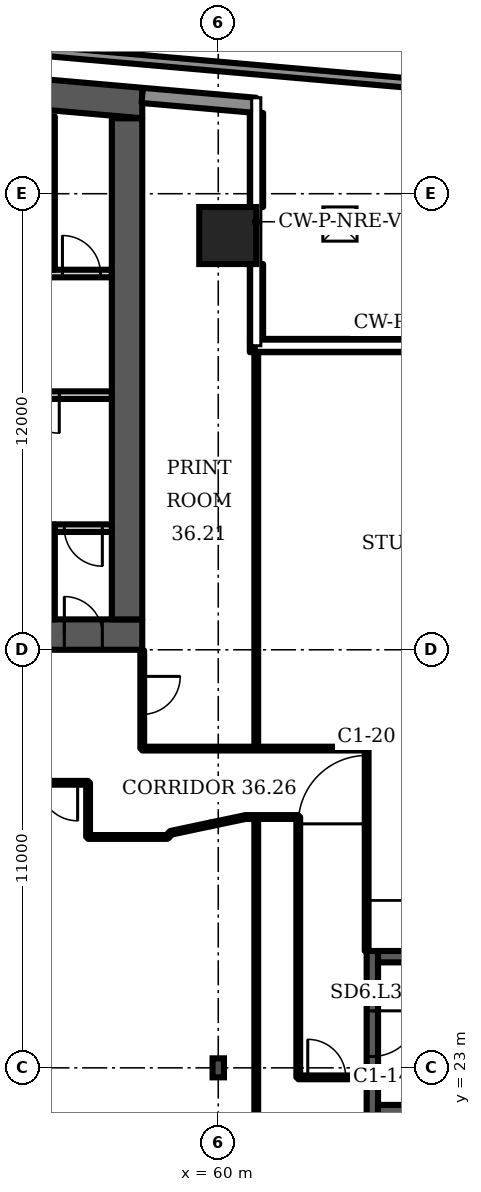
"""IFC4 building model, lengths in metres.
Left out: names, types, materials, properties, quantities, classifications, styles, units other than length and angle.
Written with IfcOpenShell. Run it as: python <this file> out.ifc"""

import sys

from ifc_helpers import new_model, si_unit, direction, frame, frame_2d, origin, origin_2d, place, context, subcontext, project, spatial, polyline, rectangle, i_section, outline, extrude, element, fill, save


model = new_model("IFC4")
c1 = context("Model", 3, precision=1e-05, world=origin(), true_north=direction((0.0, 1.0)))
c2 = subcontext(c1, "Body", "Model", "MODEL_VIEW")
j1 = project(units=[si_unit("LENGTHUNIT", "METRE"), si_unit("PLANEANGLEUNIT", "RADIAN")], contexts=[c1])
p1 = place(None, origin())
s1 = spatial("IfcSite", under=j1, at=p1, CompositionType="ELEMENT")
p2 = place(p1, origin())
s2 = spatial("IfcBuilding", under=s1, at=p2, CompositionType="ELEMENT")
p3 = place(p2, frame((0.0, 0.0, 151.9)))
s3 = spatial("IfcBuildingStorey", under=s2, at=p3, CompositionType="ELEMENT", Elevation=151.9)
p4 = place(p3, origin())
e1 = element("IfcWall", 1, at=p4, inside=s3, PredefinedType="SHEAR", context=c2, shape_type="SweptSolid", body=[
    extrude(outline(polyline([(16.0, 47.984), (37.0, 49.822), (58.0, 47.984), (58.0, 48.787), (37.0, 50.625), (16.0, 48.787), (16.0, 47.984)])), origin(), (0.0, 0.0, 1.0), 3.6),
])
p5 = place(p3, frame((16.0, 34.4, 0.0), z_axis=(0.0, 0.0, 1.0), x_axis=(1.0, 0.0, 0.0)))
e2 = element("IfcWall", 2, at=p5, inside=s3, PredefinedType="SHEAR", context=c2, shape_type="SweptSolid", body=[
    extrude(rectangle(XDim=42.0, YDim=0.8, at=frame_2d((21.0, 0.0))), origin(), (0.0, 0.0, 1.0), 3.6),
])
p6 = place(p5, frame((3.2, 0.0, 0.0)))
e3 = element("IfcOpeningElement", 3, at=p6, cuts=e2, PredefinedType="OPENING", context=c2, shape_type="SweptSolid", body=[
    extrude(rectangle(XDim=1.0, YDim=2.1, at=frame_2d((0.5, 1.05))), frame((0.0, 0.41, 0.0), z_axis=(0.0, -1.0, 0.0), x_axis=(1.0, 0.0, 0.0)), (0.0, 0.0, 1.0), 0.82),
])
p7 = place(p5, frame((7.65, 0.0, 0.0)))
e4 = element("IfcOpeningElement", 4, at=p7, cuts=e2, PredefinedType="OPENING", context=c2, shape_type="SweptSolid", body=[
    extrude(rectangle(XDim=1.2, YDim=2.1, at=frame_2d((0.6, 1.05))), frame((0.0, 0.41, 0.0), z_axis=(0.0, -1.0, 0.0), x_axis=(1.0, 0.0, 0.0)), (0.0, 0.0, 1.0), 0.82),
])
p8 = place(p5, frame((14.767, 0.0, 0.0)))
e5 = element("IfcOpeningElement", 5, at=p8, cuts=e2, PredefinedType="OPENING", context=c2, shape_type="SweptSolid", body=[
    extrude(rectangle(XDim=1.1, YDim=2.1, at=frame_2d((0.55, 1.05))), frame((0.0, 0.41, 0.0), z_axis=(0.0, -1.0, 0.0), x_axis=(1.0, 0.0, 0.0)), (0.0, 0.0, 1.0), 0.82),
])
p9 = place(p5, frame((19.133, 0.0, 0.0)))
e6 = element("IfcOpeningElement", 6, at=p9, cuts=e2, PredefinedType="OPENING", context=c2, shape_type="SweptSolid", body=[
    extrude(rectangle(XDim=1.1, YDim=2.1, at=frame_2d((0.55, 1.05))), frame((0.0, 0.41, 0.0), z_axis=(0.0, -1.0, 0.0), x_axis=(1.0, 0.0, 0.0)), (0.0, 0.0, 1.0), 0.82),
])
p10 = place(p5, frame((16.8, 0.0, 0.0)))
e7 = element("IfcOpeningElement", 7, at=p10, cuts=e2, PredefinedType="OPENING", context=c2, shape_type="SweptSolid", body=[
    extrude(rectangle(XDim=1.4, YDim=2.1, at=frame_2d((0.7, 1.05))), frame((0.0, 0.41, 0.0), z_axis=(0.0, -1.0, 0.0), x_axis=(1.0, 0.0, 0.0)), (0.0, 0.0, 1.0), 0.82),
])
p11 = place(p5, frame((21.767, 0.0, 0.0)))
e8 = element("IfcOpeningElement", 8, at=p11, cuts=e2, PredefinedType="OPENING", context=c2, shape_type="SweptSolid", body=[
    extrude(rectangle(XDim=1.1, YDim=2.1, at=frame_2d((0.55, 1.05))), frame((0.0, 0.41, 0.0), z_axis=(0.0, -1.0, 0.0), x_axis=(1.0, 0.0, 0.0)), (0.0, 0.0, 1.0), 0.82),
])
p12 = place(p5, frame((23.95, 0.0, 0.0)))
e9 = element("IfcOpeningElement", 9, at=p12, cuts=e2, PredefinedType="OPENING", context=c2, shape_type="SweptSolid", body=[
    extrude(rectangle(XDim=1.1, YDim=2.1, at=frame_2d((0.55, 1.05))), frame((0.0, 0.41, 0.0), z_axis=(0.0, -1.0, 0.0), x_axis=(1.0, 0.0, 0.0)), (0.0, 0.0, 1.0), 0.82),
])
p13 = place(p5, frame((26.133, 0.0, 0.0)))
e10 = element("IfcOpeningElement", 10, at=p13, cuts=e2, PredefinedType="OPENING", context=c2, shape_type="SweptSolid", body=[
    extrude(rectangle(XDim=1.1, YDim=2.1, at=frame_2d((0.55, 1.05))), frame((0.0, 0.41, 0.0), z_axis=(0.0, -1.0, 0.0), x_axis=(1.0, 0.0, 0.0)), (0.0, 0.0, 1.0), 0.82),
])
p14 = place(p5, frame((33.15, 0.0, 0.0)))
e11 = element("IfcOpeningElement", 11, at=p14, cuts=e2, PredefinedType="OPENING", context=c2, shape_type="SweptSolid", body=[
    extrude(rectangle(XDim=1.2, YDim=2.1, at=frame_2d((0.6, 1.05))), frame((0.0, 0.41, 0.0), z_axis=(0.0, -1.0, 0.0), x_axis=(1.0, 0.0, 0.0)), (0.0, 0.0, 1.0), 0.82),
])
p15 = place(p5, frame((35.817, 0.0, 0.0)))
e12 = element("IfcOpeningElement", 12, at=p15, cuts=e2, PredefinedType="OPENING", context=c2, shape_type="SweptSolid", body=[
    extrude(rectangle(XDim=1.0, YDim=2.1, at=frame_2d((0.5, 1.05))), frame((0.0, 0.41, 0.0), z_axis=(0.0, -1.0, 0.0), x_axis=(1.0, 0.0, 0.0)), (0.0, 0.0, 1.0), 0.82),
])
p16 = place(p5, frame((39.95, 0.0, 0.0)))
e13 = element("IfcOpeningElement", 13, at=p16, cuts=e2, PredefinedType="OPENING", context=c2, shape_type="SweptSolid", body=[
    extrude(rectangle(XDim=1.0, YDim=2.1, at=frame_2d((0.5, 1.05))), frame((0.0, 0.41, 0.0), z_axis=(0.0, -1.0, 0.0), x_axis=(1.0, 0.0, 0.0)), (0.0, 0.0, 1.0), 0.82),
])
p17 = place(p5, frame((37.767, 0.0, 0.0)))
e14 = element("IfcOpeningElement", 14, at=p17, cuts=e2, PredefinedType="OPENING", context=c2, shape_type="SweptSolid", body=[
    extrude(rectangle(XDim=1.4, YDim=2.1, at=frame_2d((0.7, 1.05))), frame((0.0, 0.41, 0.0), z_axis=(0.0, -1.0, 0.0), x_axis=(1.0, 0.0, 0.0)), (0.0, 0.0, 1.0), 0.82),
])
p18 = place(p3, frame((57.6, 34.8, 0.0), z_axis=(0.0, 0.0, 1.0), x_axis=(0.0, 1.0, 0.0)))
e15 = element("IfcWall", 15, at=p18, inside=s3, PredefinedType="SHEAR", context=c2, shape_type="SweptSolid", body=[
    extrude(rectangle(XDim=13.184, YDim=0.8, at=frame_2d((6.592, 0.0))), origin(), (0.0, 0.0, 1.0), 3.6),
])
p19 = place(p3, frame((60.25, 44.9, 0.0), z_axis=(0.0, 0.0, 1.0), x_axis=(1.0, 0.0, 0.0)))
e16 = element("IfcColumn", 16, at=p19, inside=s3, PredefinedType="COLUMN", context=c2, shape_type="SweptSolid", body=[
    extrude(rectangle(XDim=1.5, YDim=1.5, at=origin_2d()), origin(), (0.0, 0.0, 1.0), 3.6),
])
p20 = place(p3, frame((60.0, 23.0, 0.0), z_axis=(0.0, 0.0, 1.0), x_axis=(1.0, 0.0, 0.0)))
e17 = element("IfcColumn", 17, at=p20, inside=s3, PredefinedType="COLUMN", context=c2, shape_type="SweptSolid", body=[
    extrude(i_section(OverallWidth=0.3, OverallDepth=0.5, WebThickness=0.014, FlangeThickness=0.028, FilletRadius=0.027, at=origin_2d()), origin(), (0.0, 0.0, 1.0), 3.6),
])
p21 = place(p3, frame((60.983, 48.326, 0.0), z_axis=(0.0, 0.0, 1.0), x_axis=(-0.996194, 0.087168, 0.0)))
e18 = element("IfcWall", 18, at=p21, inside=s3, PredefinedType="SOLIDWALL", context=c2, shape_type="SweptSolid", body=[
    extrude(rectangle(XDim=2.994, YDim=0.4, at=frame_2d((1.497, 0.0))), origin(), (0.0, 0.0, 1.0), 3.2),
])
p22 = place(p3, frame((40.5, 51.056, 0.0), z_axis=(0.0, 0.0, 1.0), x_axis=(0.996199, -0.087155, 0.0)))
e19 = element("IfcWall", 19, at=p22, inside=s3, PredefinedType="PARAPET", context=c2, shape_type="SweptSolid", body=[
    extrude(rectangle(XDim=27.855, YDim=0.25, at=frame_2d((13.928, 0.0))), origin(), (0.0, 0.0, 1.0), 1.1),
])
p23 = place(p3, frame((68.0, 42.005, 0.0), z_axis=(0.0, 0.0, 1.0), x_axis=(-1.0, 0.0, 0.0)))
e20 = element("IfcWall", 20, at=p23, inside=s3, PredefinedType="SOLIDWALL", context=c2, shape_type="SweptSolid", body=[
    extrude(rectangle(XDim=7.17, YDim=0.35, at=frame_2d((3.585, 0.0))), origin(), (0.0, 0.0, 1.0), 1.0),
])
p24 = place(p3, frame((61.005, 42.18, 0.0), z_axis=(0.0, 0.0, 1.0), x_axis=(0.0, 1.0, 0.0)))
e21 = element("IfcWall", 21, at=p24, inside=s3, PredefinedType="SOLIDWALL", context=c2, shape_type="SweptSolid", body=[
    extrude(rectangle(XDim=1.97, YDim=0.35, at=frame_2d((0.985, 0.0))), origin(), (0.0, 0.0, 1.0), 1.0),
])
p25 = place(p3, frame((61.005, 45.65, 0.0), z_axis=(0.0, 0.0, 1.0), x_axis=(0.0, 1.0, 0.0)))
e22 = element("IfcWall", 22, at=p25, inside=s3, PredefinedType="SOLIDWALL", context=c2, shape_type="SweptSolid", body=[
    extrude(rectangle(XDim=2.477, YDim=0.35, at=frame_2d((1.238, 0.0))), origin(), (0.0, 0.0, 1.0), 1.0),
])
p26 = place(p3, frame((55.7, 37.2, 0.0), z_axis=(0.0, 0.0, 1.0), x_axis=(1.0, 0.0, 0.0)))
e23 = element("IfcWall", 23, at=p26, inside=s3, PredefinedType="PARTITIONING", context=c2, shape_type="SweptSolid", body=[
    extrude(rectangle(XDim=1.5, YDim=0.2, at=frame_2d((0.75, 0.0))), origin(), (0.0, 0.0, 1.0), 3.2),
])
p27 = place(p26, frame((0.25, 0.0, 0.0)))
e24 = element("IfcOpeningElement", 24, at=p27, cuts=e23, PredefinedType="OPENING", context=c2, shape_type="SweptSolid", body=[
    extrude(rectangle(XDim=1.0, YDim=2.1, at=frame_2d((0.5, 1.05))), frame((0.0, 0.11, 0.0), z_axis=(0.0, -1.0, 0.0), x_axis=(1.0, 0.0, 0.0)), (0.0, 0.0, 1.0), 0.22),
])
p28 = place(p3, frame((51.4, 40.7, 0.0), z_axis=(0.0, 0.0, 1.0), x_axis=(1.0, 0.0, 0.0)))
e25 = element("IfcWall", 25, at=p28, inside=s3, PredefinedType="PARTITIONING", context=c2, shape_type="SweptSolid", body=[
    extrude(rectangle(XDim=5.8, YDim=0.2, at=frame_2d((2.9, 0.0))), origin(), (0.0, 0.0, 1.0), 3.2),
])
p29 = place(p28, frame((0.367, 0.0, 0.0)))
e26 = element("IfcOpeningElement", 26, at=p29, cuts=e25, PredefinedType="OPENING", context=c2, shape_type="SweptSolid", body=[
    extrude(rectangle(XDim=1.1, YDim=2.1, at=frame_2d((0.55, 1.05))), frame((0.0, 0.11, 0.0), z_axis=(0.0, -1.0, 0.0), x_axis=(1.0, 0.0, 0.0)), (0.0, 0.0, 1.0), 0.22),
])
p30 = place(p28, frame((3.417, 0.0, 0.0)))
e27 = element("IfcOpeningElement", 27, at=p30, cuts=e25, PredefinedType="OPENING", context=c2, shape_type="SweptSolid", body=[
    extrude(rectangle(XDim=1.0, YDim=2.1, at=frame_2d((0.5, 1.05))), frame((0.0, 0.11, 0.0), z_axis=(0.0, -1.0, 0.0), x_axis=(1.0, 0.0, 0.0)), (0.0, 0.0, 1.0), 0.22),
])
p31 = place(p3, frame((51.4, 43.9, 0.0), z_axis=(0.0, 0.0, 1.0), x_axis=(1.0, 0.0, 0.0)))
e28 = element("IfcWall", 28, at=p31, inside=s3, PredefinedType="PARTITIONING", context=c2, shape_type="SweptSolid", body=[
    extrude(rectangle(XDim=5.8, YDim=0.2, at=frame_2d((2.9, 0.0))), origin(), (0.0, 0.0, 1.0), 3.2),
])
p32 = place(p31, frame((2.617, 0.0, 0.0)))
e29 = element("IfcOpeningElement", 29, at=p32, cuts=e28, PredefinedType="OPENING", context=c2, shape_type="SweptSolid", body=[
    extrude(rectangle(XDim=1.0, YDim=2.1, at=frame_2d((0.5, 1.05))), frame((0.0, 0.11, 0.0), z_axis=(0.0, -1.0, 0.0), x_axis=(1.0, 0.0, 0.0)), (0.0, 0.0, 1.0), 0.22),
])
p33 = place(p31, frame((4.5, 0.0, 0.0)))
e30 = element("IfcOpeningElement", 30, at=p33, cuts=e28, PredefinedType="OPENING", context=c2, shape_type="SweptSolid", body=[
    extrude(rectangle(XDim=1.0, YDim=2.1, at=frame_2d((0.5, 1.05))), frame((0.0, 0.11, 0.0), z_axis=(0.0, -1.0, 0.0), x_axis=(1.0, 0.0, 0.0)), (0.0, 0.0, 1.0), 0.22),
])
p34 = place(p3, origin())
e31 = element("IfcWall", 31, at=p34, inside=s3, PredefinedType="PARTITIONING", context=c2, shape_type="SweptSolid", body=[
    extrude(outline(polyline([(55.5, 34.8), (55.5, 37.3), (55.7, 37.3), (55.7, 34.8), (55.5, 34.8)])), origin(), (0.0, 0.0, 1.0), 3.2),
])
p35 = place(p3, frame((55.6, 44.0, 0.0), z_axis=(0.0, 0.0, 1.0), x_axis=(0.0, 1.0, 0.0)))
e32 = element("IfcWall", 32, at=p35, inside=s3, PredefinedType="PARTITIONING", context=c2, shape_type="SweptSolid", body=[
    extrude(rectangle(XDim=4.034, YDim=0.2, at=frame_2d((2.017, 0.0))), origin(), (0.0, 0.0, 1.0), 3.2),
])
p36 = place(p3, frame((64.055, 21.725, 0.0), z_axis=(0.0, 0.0, 1.0), x_axis=(0.0, 1.0, 0.0)))
e33 = element("IfcWall", 33, at=p36, inside=s3, PredefinedType="SHEAR", context=c2, shape_type="SweptSolid", body=[
    extrude(rectangle(XDim=4.35, YDim=0.3, at=frame_2d((2.175, 0.0))), origin(), (0.0, 0.0, 1.0), 3.2),
])
p37 = place(p36, frame((1.575, 0.0, 0.0)))
e34 = element("IfcOpeningElement", 34, at=p37, cuts=e33, PredefinedType="OPENING", context=c2, shape_type="SweptSolid", body=[
    extrude(rectangle(XDim=1.2, YDim=2.1, at=frame_2d((0.6, 1.05))), frame((0.0, 0.16, 0.0), z_axis=(0.0, -1.0, 0.0), x_axis=(1.0, 0.0, 0.0)), (0.0, 0.0, 1.0), 0.32),
])
p38 = place(p3, frame((56.575, 29.075, 0.0), z_axis=(0.0, 0.0, 1.0), x_axis=(0.0, 1.0, 0.0)))
e35 = element("IfcWall", 35, at=p38, inside=s3, PredefinedType="PARTITIONING", context=c2, shape_type="SweptSolid", body=[
    extrude(rectangle(XDim=1.425, YDim=0.1, at=frame_2d((0.712, 0.0))), origin(), (0.0, 0.0, 1.0), 3.2),
])
p39 = place(p3, frame((56.575, 29.075, 0.0), z_axis=(0.0, 0.0, 1.0), x_axis=(1.0, 0.0, 0.0)))
e36 = element("IfcWall", 36, at=p39, inside=s3, PredefinedType="PARTITIONING", context=c2, shape_type="SweptSolid", body=[
    extrude(rectangle(XDim=2.08, YDim=0.1, at=frame_2d((1.04, 0.0))), origin(), (0.0, 0.0, 1.0), 3.2),
])
p40 = place(p3, frame((58.0, 31.4, 0.0), z_axis=(0.0, 0.0, 1.0), x_axis=(0.0, 1.0, 0.0)))
e37 = element("IfcWall", 37, at=p40, inside=s3, PredefinedType="PARTITIONING", context=c2, shape_type="SweptSolid", body=[
    extrude(rectangle(XDim=2.58, YDim=0.1, at=frame_2d((1.29, 0.0))), origin(), (0.0, 0.0, 1.0), 3.2),
])
p41 = place(p40, frame((0.9, 0.0, 0.0)))
e38 = element("IfcOpeningElement", 38, at=p41, cuts=e37, PredefinedType="OPENING", context=c2, shape_type="SweptSolid", body=[
    extrude(rectangle(XDim=1.0, YDim=2.1, at=frame_2d((0.5, 1.05))), frame((0.0, 0.06, 0.0), z_axis=(0.0, -1.0, 0.0), x_axis=(1.0, 0.0, 0.0)), (0.0, 0.0, 1.0), 0.12),
])
p42 = place(p3, frame((58.0, 31.4, 0.0), z_axis=(0.0, 0.0, 1.0), x_axis=(1.0, 0.0, 0.0)))
e39 = element("IfcWall", 39, at=p42, inside=s3, PredefinedType="PARTITIONING", context=c2, shape_type="SweptSolid", body=[
    extrude(rectangle(XDim=5.905, YDim=0.1, at=frame_2d((2.953, 0.0))), origin(), (0.0, 0.0, 1.0), 3.2),
])
p43 = place(p3, frame((58.655, 29.075, 0.0), z_axis=(0.0, 0.0, 1.0), x_axis=(0.671773, 0.740757, 0.0)))
e40 = element("IfcWall", 40, at=p43, inside=s3, PredefinedType="PARTITIONING", context=c2, shape_type="SweptSolid", body=[
    extrude(rectangle(XDim=0.149, YDim=0.1, at=frame_2d((0.074, 0.0))), origin(), (0.0, 0.0, 1.0), 3.2),
])
p44 = place(p3, frame((58.755, 29.185, 0.0), z_axis=(0.0, 0.0, 1.0), x_axis=(0.97816, 0.207859, 0.0)))
e41 = element("IfcWall", 41, at=p44, inside=s3, PredefinedType="PARTITIONING", context=c2, shape_type="SweptSolid", body=[
    extrude(rectangle(XDim=1.058, YDim=0.1, at=frame_2d((0.529, 0.0))), origin(), (0.0, 0.0, 1.0), 3.2),
])
p45 = place(p3, frame((59.79, 29.405, 0.0), z_axis=(0.0, 0.0, 1.0), x_axis=(0.978703, 0.205299, 0.0)))
e42 = element("IfcWall", 42, at=p45, inside=s3, PredefinedType="PARTITIONING", context=c2, shape_type="SweptSolid", body=[
    extrude(rectangle(XDim=0.95, YDim=0.1, at=frame_2d((0.475, 0.0))), origin(), (0.0, 0.0, 1.0), 3.2),
])
p46 = place(p3, frame((60.72, 29.6, 0.0), z_axis=(0.0, 0.0, 1.0), x_axis=(1.0, 0.0, 0.0)))
e43 = element("IfcWall", 43, at=p46, inside=s3, PredefinedType="PARTITIONING", context=c2, shape_type="SweptSolid", body=[
    extrude(rectangle(XDim=1.385, YDim=0.1, at=frame_2d((0.692, 0.0))), origin(), (0.0, 0.0, 1.0), 3.2),
])
p47 = place(p3, frame((61.0, 15.27, 0.0), z_axis=(0.0, 0.0, 1.0), x_axis=(0.0, 1.0, 0.0)))
e44 = element("IfcWall", 44, at=p47, inside=s3, PredefinedType="PARTITIONING", context=c2, shape_type="SweptSolid", body=[
    extrude(rectangle(XDim=14.33, YDim=0.1, at=frame_2d((7.165, 0.0))), origin(), (0.0, 0.0, 1.0), 3.2),
])
p48 = place(p3, frame((61.0, 31.4, 0.0), z_axis=(0.0, 0.0, 1.0), x_axis=(0.0, 1.0, 0.0)))
e45 = element("IfcWall", 45, at=p48, inside=s3, PredefinedType="PARTITIONING", context=c2, shape_type="SweptSolid", body=[
    extrude(rectangle(XDim=10.58, YDim=0.1, at=frame_2d((5.29, 0.0))), origin(), (0.0, 0.0, 1.0), 3.2),
])
p49 = place(p3, frame((62.105, 22.75, 0.0), z_axis=(0.0, 0.0, 1.0), x_axis=(0.0, 1.0, 0.0)))
e46 = element("IfcWall", 46, at=p49, inside=s3, PredefinedType="PARTITIONING", context=c2, shape_type="SweptSolid", body=[
    extrude(rectangle(XDim=6.85, YDim=0.1, at=frame_2d((3.425, 0.0))), origin(), (0.0, 0.0, 1.0), 3.2),
])
p50 = place(p3, frame((62.105, 22.75, 0.0), z_axis=(0.0, 0.0, 1.0), x_axis=(1.0, 0.0, 0.0)))
e47 = element("IfcWall", 47, at=p50, inside=s3, PredefinedType="PARTITIONING", context=c2, shape_type="SweptSolid", body=[
    extrude(rectangle(XDim=1.78, YDim=0.1, at=frame_2d((0.89, 0.0))), origin(), (0.0, 0.0, 1.0), 3.2),
])
p51 = place(p50, frame((0.25, 0.0, 0.0)))
e48 = element("IfcOpeningElement", 48, at=p51, cuts=e47, PredefinedType="OPENING", context=c2, shape_type="SweptSolid", body=[
    extrude(rectangle(XDim=1.0, YDim=2.1, at=frame_2d((0.5, 1.05))), frame((0.0, 0.06, 0.0), z_axis=(0.0, -1.0, 0.0), x_axis=(1.0, 0.0, 0.0)), (0.0, 0.0, 1.0), 0.12),
])
p52 = place(p3, frame((63.905, 26.075, 0.0), z_axis=(0.0, 0.0, 1.0), x_axis=(0.0, 1.0, 0.0)))
e49 = element("IfcWall", 49, at=p52, inside=s3, PredefinedType="PARTITIONING", context=c2, shape_type="SweptSolid", body=[
    extrude(rectangle(XDim=5.325, YDim=0.1, at=frame_2d((2.663, 0.0))), origin(), (0.0, 0.0, 1.0), 3.2),
])
p53 = place(p52, frame((3.345, 0.0, 0.0)))
e50 = element("IfcOpeningElement", 50, at=p53, cuts=e49, PredefinedType="OPENING", context=c2, shape_type="SweptSolid", body=[
    extrude(rectangle(XDim=1.8, YDim=2.1, at=frame_2d((0.9, 1.05))), frame((0.0, 0.06, 0.0), z_axis=(0.0, -1.0, 0.0), x_axis=(1.0, 0.0, 0.0)), (0.0, 0.0, 1.0), 0.12),
])
p54 = place(p3, frame((44.15, 30.5, 0.0), z_axis=(0.0, 0.0, 1.0), x_axis=(1.0, 0.0, 0.0)))
e51 = element("IfcWall", 51, at=p54, inside=s3, PredefinedType="PARTITIONING", context=c2, shape_type="SweptSolid", body=[
    extrude(rectangle(XDim=12.425, YDim=0.1, at=frame_2d((6.212, 0.0))), origin(), (0.0, 0.0, 1.0), 3.2),
])
p55 = place(p54, frame((11.15, 0.0, 0.0)))
e52 = element("IfcOpeningElement", 52, at=p55, cuts=e51, PredefinedType="OPENING", context=c2, shape_type="SweptSolid", body=[
    extrude(rectangle(XDim=1.0, YDim=2.1, at=frame_2d((0.5, 1.05))), frame((0.0, 0.06, 0.0), z_axis=(0.0, -1.0, 0.0), x_axis=(1.0, 0.0, 0.0)), (0.0, 0.0, 1.0), 0.12),
])
for number, where, z_axis, x_axis in (
    (53, (64.205, 21.875, 0.0), (0.0, 0.0, 1.0), (1.0, 0.0, 0.0)),
    (54, (64.205, 25.925, 0.0), (0.0, 0.0, 1.0), (1.0, 0.0, 0.0)),
):
    element("IfcWall", number, at=place(p3, frame(where, z_axis=z_axis, x_axis=x_axis)), inside=s3, PredefinedType="SHEAR", context=c2, shape_type="SweptSolid", body=[
        extrude(rectangle(XDim=7.5, YDim=0.3, at=frame_2d((3.75, 0.0))), origin(), (0.0, 0.0, 1.0), 3.2),
    ])
p56 = place(p3, frame((0.0, 0.0, -0.4)))
p57 = place(p56, frame((63.202, 45.202, 0.0)))
p58 = place(p57, frame((0.0, 0.0, 0.36)))
e55 = element("IfcDoor", 55, at=p58, inside=s3, OperationType="SINGLE_SWING_LEFT", PredefinedType="TRAPDOOR", context=c2, shape_type="SweptSolid", body=[
    extrude(rectangle(XDim=0.9, YDim=0.9, at=origin_2d()), origin(), (0.0, 0.0, 1.0), 0.05),
])
p59 = place(p16, origin())
e56 = element("IfcDoor", 56, at=p59, inside=s3, OperationType="SINGLE_SWING_LEFT", PredefinedType="DOOR", context=c2, shape_type="SweptSolid", body=[
    extrude(rectangle(XDim=1.0, YDim=2.1, at=frame_2d((0.5, 1.05))), frame((0.0, 0.4, 0.0), z_axis=(0.0, -1.0, 0.0), x_axis=(1.0, 0.0, 0.0)), (0.0, 0.0, 1.0), 0.8),
])
fill(e13, e56)
p60 = place(p27, origin())
e57 = element("IfcDoor", 57, at=p60, inside=s3, OperationType="SINGLE_SWING_RIGHT", PredefinedType="DOOR", context=c2, shape_type="SweptSolid", body=[
    extrude(rectangle(XDim=1.0, YDim=2.1, at=frame_2d((0.5, 1.05))), frame((0.0, 0.025, 0.0), z_axis=(0.0, -1.0, 0.0), x_axis=(1.0, 0.0, 0.0)), (0.0, 0.0, 1.0), 0.05),
])
fill(e24, e57)
p61 = place(p30, origin())
e58 = element("IfcDoor", 58, at=p61, inside=s3, OperationType="SINGLE_SWING_RIGHT", PredefinedType="DOOR", context=c2, shape_type="SweptSolid", body=[
    extrude(rectangle(XDim=1.0, YDim=2.1, at=frame_2d((0.5, 1.05))), frame((0.0, 0.025, 0.0), z_axis=(0.0, -1.0, 0.0), x_axis=(1.0, 0.0, 0.0)), (0.0, 0.0, 1.0), 0.05),
])
fill(e27, e58)
p62 = place(p33, origin())
e59 = element("IfcDoor", 59, at=p62, inside=s3, OperationType="SINGLE_SWING_LEFT", PredefinedType="DOOR", context=c2, shape_type="SweptSolid", body=[
    extrude(rectangle(XDim=1.0, YDim=2.1, at=frame_2d((0.5, 1.05))), frame((0.0, 0.025, 0.0), z_axis=(0.0, -1.0, 0.0), x_axis=(1.0, 0.0, 0.0)), (0.0, 0.0, 1.0), 0.05),
])
fill(e30, e59)
p63 = place(p37, origin())
e60 = element("IfcDoor", 60, at=p63, inside=s3, OperationType="SINGLE_SWING_RIGHT", PredefinedType="DOOR", context=c2, shape_type="SweptSolid", body=[
    extrude(rectangle(XDim=1.2, YDim=2.1, at=frame_2d((0.6, 1.05))), frame((0.0, 0.025, 0.0), z_axis=(0.0, -1.0, 0.0), x_axis=(1.0, 0.0, 0.0)), (0.0, 0.0, 1.0), 0.05),
])
fill(e34, e60)
p64 = place(p51, origin())
e61 = element("IfcDoor", 61, at=p64, inside=s3, OperationType="SINGLE_SWING_LEFT", PredefinedType="DOOR", context=c2, shape_type="SweptSolid", body=[
    extrude(rectangle(XDim=1.0, YDim=2.1, at=frame_2d((0.5, 1.05))), frame((0.0, 0.025, 0.0), z_axis=(0.0, -1.0, 0.0), x_axis=(1.0, 0.0, 0.0)), (0.0, 0.0, 1.0), 0.05),
])
fill(e48, e61)
p65 = place(p53, origin())
e62 = element("IfcDoor", 62, at=p65, inside=s3, OperationType="DOUBLE_DOOR_SINGLE_SWING", PredefinedType="DOOR", context=c2, shape_type="SweptSolid", body=[
    extrude(rectangle(XDim=1.8, YDim=2.1, at=frame_2d((0.9, 1.05))), frame((0.0, 0.025, 0.0), z_axis=(0.0, -1.0, 0.0), x_axis=(1.0, 0.0, 0.0)), (0.0, 0.0, 1.0), 0.05),
])
fill(e50, e62)
p66 = place(p55, origin())
e63 = element("IfcDoor", 63, at=p66, inside=s3, OperationType="SINGLE_SWING_RIGHT", PredefinedType="DOOR", context=c2, shape_type="SweptSolid", body=[
    extrude(rectangle(XDim=1.0, YDim=2.1, at=frame_2d((0.5, 1.05))), frame((0.0, 0.025, 0.0), z_axis=(0.0, -1.0, 0.0), x_axis=(1.0, 0.0, 0.0)), (0.0, 0.0, 1.0), 0.05),
])
fill(e52, e63)
p67 = place(p41, origin())
e64 = element("IfcDoor", 64, at=p67, inside=s3, OperationType="SINGLE_SWING_RIGHT", PredefinedType="DOOR", context=c2, shape_type="SweptSolid", body=[
    extrude(rectangle(XDim=1.0, YDim=2.1, at=frame_2d((0.5, 1.05))), frame((0.0, 0.025, 0.0), z_axis=(0.0, -1.0, 0.0), x_axis=(1.0, 0.0, 0.0)), (0.0, 0.0, 1.0), 0.05),
])
fill(e38, e64)
save(model, sys.argv[1])
